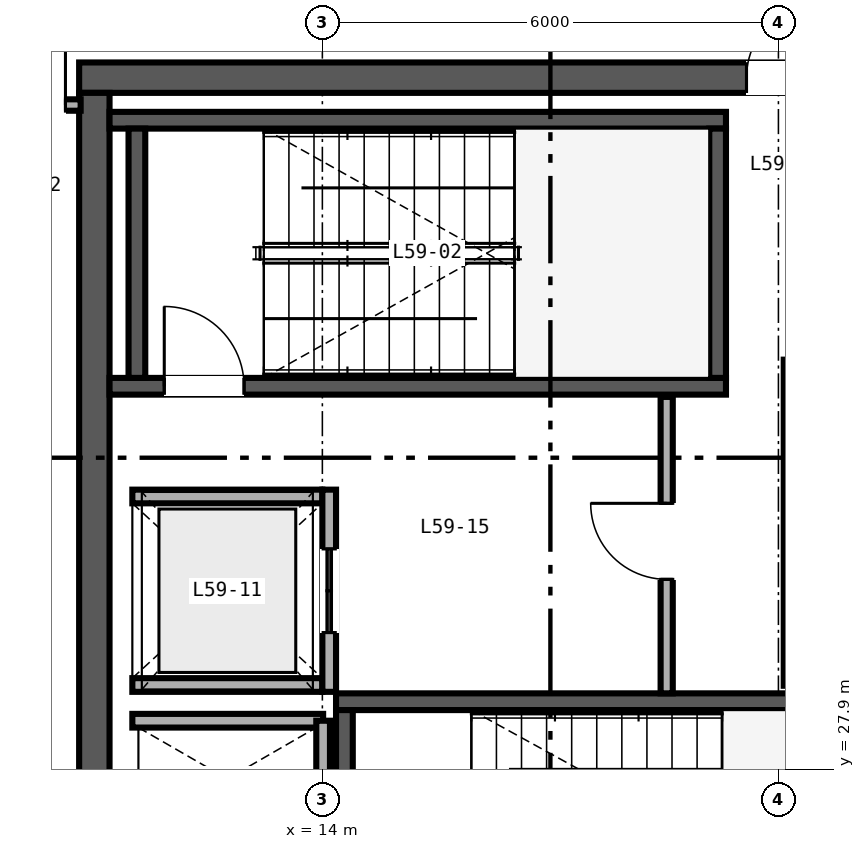
"""IFC4 building model, lengths in metres.
Left out: names, types, materials, properties, quantities, classifications, styles, units other than length and angle.
Written with IfcOpenShell. Run it as: python <this file> out.ifc"""

import sys

from ifc_helpers import new_model, si_unit, direction, frame, frame_2d, origin, place, context, subcontext, project, spatial, rectangle, extrude, source, transform, mapped, element, fill, save


model = new_model("IFC4")
c1 = context("Model", 3, precision=1e-05, world=origin(), true_north=direction((0.0, 1.0)))
c2 = subcontext(c1, "Body", "Model", "MODEL_VIEW")
j1 = project(units=[si_unit("LENGTHUNIT", "METRE"), si_unit("PLANEANGLEUNIT", "RADIAN")], contexts=[c1])
p1 = place(None, origin())
s1 = spatial("IfcSite", under=j1, at=p1, CompositionType="ELEMENT")
p2 = place(p1, origin())
s2 = spatial("IfcBuilding", under=s1, at=p2, CompositionType="ELEMENT")
p3 = place(p2, frame((0.0, 0.0, 236.4)))
s3 = spatial("IfcBuildingStorey", under=s2, at=p3, CompositionType="ELEMENT", Elevation=236.4)
p4 = place(p3, frame((10.8, 37.0, 0.0), z_axis=(0.0, 0.0, 1.0), x_axis=(1.0, 0.0, 0.0)))
e1 = element("IfcWall", 1, at=p4, inside=s3, PredefinedType="SHEAR", context=c2, shape_type="SweptSolid", body=[
    extrude(rectangle(XDim=12.4, YDim=0.4, at=frame_2d((6.2, 0.0))), origin(), (0.0, 0.0, 1.0), 3.38),
])
p5 = place(p4, frame((8.78, 0.0, 0.0)))
e2 = element("IfcOpeningElement", 2, at=p5, cuts=e1, PredefinedType="OPENING", context=c2, shape_type="SweptSolid", body=[
    extrude(rectangle(XDim=1.0, YDim=2.15, at=frame_2d((0.5, 1.075))), frame((0.0, 0.21, 0.0), z_axis=(0.0, -1.0, 0.0), x_axis=(1.0, 0.0, 0.0)), (0.0, 0.0, 1.0), 0.42),
])
p6 = place(p3, frame((11.0, 15.2, 0.0), z_axis=(0.0, 0.0, 1.0), x_axis=(0.0, 1.0, 0.0)))
e3 = element("IfcWall", 3, at=p6, inside=s3, PredefinedType="SHEAR", context=c2, shape_type="SweptSolid", body=[
    extrude(rectangle(XDim=21.6, YDim=0.4, at=frame_2d((10.8, 0.0))), origin(), (0.0, 0.0, 1.0), 3.38),
])
p7 = place(p3, frame((11.2, 32.94, 0.0), z_axis=(0.0, 0.0, 1.0), x_axis=(1.0, 0.0, 0.0)))
e4 = element("IfcWall", 4, at=p7, inside=s3, PredefinedType="SHEAR", context=c2, shape_type="SweptSolid", body=[
    extrude(rectangle(XDim=8.11, YDim=0.22, at=frame_2d((4.055, 0.0))), origin(), (0.0, 0.0, 1.0), 3.4),
])
p8 = place(p7, frame((0.72, 0.0, 0.0)))
e5 = element("IfcOpeningElement", 5, at=p8, cuts=e4, PredefinedType="OPENING", context=c2, shape_type="SweptSolid", body=[
    extrude(rectangle(XDim=1.05, YDim=2.15, at=frame_2d((0.525, 1.075))), frame((0.0, 0.12, 0.0), z_axis=(0.0, -1.0, 0.0), x_axis=(1.0, 0.0, 0.0)), (0.0, 0.0, 1.0), 0.24),
])
p9 = place(p3, frame((11.2, 36.44, 0.0), z_axis=(0.0, 0.0, 1.0), x_axis=(1.0, 0.0, 0.0)))
e6 = element("IfcWall", 6, at=p9, inside=s3, PredefinedType="SHEAR", context=c2, shape_type="SweptSolid", body=[
    extrude(rectangle(XDim=8.11, YDim=0.22, at=frame_2d((4.055, 0.0))), origin(), (0.0, 0.0, 1.0), 3.4),
])
for number, where, z_axis, x_axis in (
    (7, (11.56, 33.05, 0.0), (0.0, 0.0, 1.0), (0.0, 1.0, 0.0)),
    (8, (19.2, 33.05, 0.0), (0.0, 0.0, 1.0), (0.0, 1.0, 0.0)),
):
    element("IfcWall", number, at=place(p3, frame(where, z_axis=z_axis, x_axis=x_axis)), inside=s3, PredefinedType="SHEAR", context=c2, shape_type="SweptSolid", body=[
        extrude(rectangle(XDim=3.28, YDim=0.22, at=frame_2d((1.64, 0.0))), origin(), (0.0, 0.0, 1.0), 3.4),
    ])
p10 = place(p3, frame((14.18, 28.79, 0.0), z_axis=(0.0, 0.0, 1.0), x_axis=(1.0, 0.0, 0.0)))
e9 = element("IfcWall", 9, at=p10, inside=s3, PredefinedType="SHEAR", context=c2, shape_type="SweptSolid", body=[
    extrude(rectangle(XDim=8.62, YDim=0.22, at=frame_2d((4.31, 0.0))), origin(), (0.0, 0.0, 1.0), 3.4),
])
p11 = place(p3, frame((14.29, 25.4, 0.0), z_axis=(0.0, 0.0, 1.0), x_axis=(0.0, 1.0, 0.0)))
e10 = element("IfcWall", 10, at=p11, inside=s3, PredefinedType="SHEAR", context=c2, shape_type="SweptSolid", body=[
    extrude(rectangle(XDim=3.28, YDim=0.22, at=frame_2d((1.64, 0.0))), origin(), (0.0, 0.0, 1.0), 3.4),
])
p12 = place(p3, frame((20.16, 29.0, 0.0), z_axis=(0.0, 0.0, 1.0), x_axis=(0.0, 1.0, 0.0)))
e11 = element("IfcWall", 11, at=p12, inside=s3, PredefinedType="SOLIDWALL", context=c2, shape_type="SweptSolid", body=[
    extrude(rectangle(XDim=4.29, YDim=0.18, at=frame_2d((2.145, 0.0))), origin(), (0.0, 0.0, 1.0), 3.38),
])
for number, where, z_axis, x_axis in (
    (12, (11.5, 29.01, 0.0), (0.0, 0.0, 1.0), (1.0, 0.0, 0.0)),
    (13, (11.5, 31.49, 0.0), (0.0, 0.0, 1.0), (1.0, 0.0, 0.0)),
):
    element("IfcWall", number, at=place(p3, frame(where, z_axis=z_axis, x_axis=x_axis)), inside=s3, PredefinedType="SOLIDWALL", context=c2, shape_type="SweptSolid", body=[
        extrude(rectangle(XDim=2.5, YDim=0.18, at=frame_2d((1.25, 0.0))), origin(), (0.0, 0.0, 1.0), 3.38),
    ])
p13 = place(p3, frame((14.09, 28.92, 0.0), z_axis=(0.0, 0.0, 1.0), x_axis=(0.0, 1.0, 0.0)))
e14 = element("IfcWall", 14, at=p13, inside=s3, PredefinedType="SOLIDWALL", context=c2, shape_type="SweptSolid", body=[
    extrude(rectangle(XDim=2.66, YDim=0.18, at=frame_2d((1.33, 0.0))), origin(), (0.0, 0.0, 1.0), 3.38),
])
p14 = place(p13, frame((0.78, 0.0, 0.0)))
e15 = element("IfcOpeningElement", 15, at=p14, cuts=e14, PredefinedType="OPENING", context=c2, shape_type="SweptSolid", body=[
    extrude(rectangle(XDim=1.1, YDim=2.2, at=frame_2d((0.55, 1.1))), frame((0.0, 0.1, 0.0), z_axis=(0.0, -1.0, 0.0), x_axis=(1.0, 0.0, 0.0)), (0.0, 0.0, 1.0), 0.2),
])
p15 = place(p3, frame((11.5, 28.54, 0.0), z_axis=(0.0, 0.0, 1.0), x_axis=(1.0, 0.0, 0.0)))
e16 = element("IfcWall", 16, at=p15, inside=s3, PredefinedType="SOLIDWALL", context=c2, shape_type="SweptSolid", body=[
    extrude(rectangle(XDim=2.51, YDim=0.18, at=frame_2d((1.255, 0.0))), origin(), (0.0, 0.0, 1.0), 3.38),
])
p16 = place(p3, frame((14.01, 25.46, 0.0), z_axis=(0.0, 0.0, 1.0), x_axis=(0.0, 1.0, 0.0)))
e17 = element("IfcWall", 17, at=p16, inside=s3, PredefinedType="SOLIDWALL", context=c2, shape_type="SweptSolid", body=[
    extrude(rectangle(XDim=3.08, YDim=0.18, at=frame_2d((1.54, 0.0))), origin(), (0.0, 0.0, 1.0), 3.38),
])
p17 = place(p3, frame((18.53, 28.9, 0.0), z_axis=(0.0, 0.0, 1.0), x_axis=(0.0, 1.0, 0.0)))
e18 = element("IfcWall", 18, at=p17, inside=s3, PredefinedType="PARTITIONING", context=c2, shape_type="SweptSolid", body=[
    extrude(rectangle(XDim=3.9, YDim=0.16, at=frame_2d((1.95, 0.0))), origin(), (0.0, 0.0, 1.0), 3.38),
])
p18 = place(p17, frame((1.5, 0.0, 0.0)))
e19 = element("IfcOpeningElement", 19, at=p18, cuts=e18, PredefinedType="OPENING", context=c2, shape_type="SweptSolid", body=[
    extrude(rectangle(XDim=1.0, YDim=2.15, at=frame_2d((0.5, 1.075))), frame((0.0, 0.09, 0.0), z_axis=(0.0, -1.0, 0.0), x_axis=(1.0, 0.0, 0.0)), (0.0, 0.0, 1.0), 0.18),
])
p19 = place(p3, frame((8.16, 36.64, 0.0), z_axis=(0.0, 0.0, 1.0), x_axis=(1.0, 0.0, 0.0)))
e20 = element("IfcWall", 20, at=p19, inside=s3, PredefinedType="PARTITIONING", context=c2, shape_type="SweptSolid", body=[
    extrude(rectangle(XDim=2.66, YDim=0.15, at=frame_2d((1.33, 0.0))), origin(), (0.0, 0.0, 1.0), 2.763),
])
p20 = place(p19, frame((1.58, 0.0, 0.0)))
e21 = element("IfcOpeningElement", 21, at=p20, cuts=e20, PredefinedType="OPENING", context=c2, shape_type="SweptSolid", body=[
    extrude(rectangle(XDim=0.88, YDim=2.15, at=frame_2d((0.44, 1.075))), frame((0.0, 0.085, 0.0), z_axis=(0.0, -1.0, 0.0), x_axis=(1.0, 0.0, 0.0)), (0.0, 0.0, 1.0), 0.17),
])
m1 = source(origin(), c2, "Body", "SweptSolid", [
    extrude(rectangle(XDim=1.05, YDim=2.15, at=frame_2d((0.525, 1.075))), frame((0.0, 0.025, 0.0), z_axis=(0.0, -1.0, 0.0), x_axis=(1.0, 0.0, 0.0)), (0.0, 0.0, 1.0), 0.05),
])
p21 = place(p8, origin())
e22 = element("IfcDoor", 22, at=p21, inside=s3, OperationType="SINGLE_SWING_LEFT", PredefinedType="DOOR", context=c2, shape_type="MappedRepresentation", body=[
    mapped(m1, transform((0.0, 0.0, 0.0), scale=1.0)),
])
fill(e5, e22)
m2 = source(origin(), c2, "Body", "SweptSolid", [
    extrude(rectangle(XDim=1.1, YDim=2.2, at=frame_2d((0.55, 1.1))), frame((0.0, 0.025, 0.0), z_axis=(0.0, -1.0, 0.0), x_axis=(1.0, 0.0, 0.0)), (0.0, 0.0, 1.0), 0.05),
])
p22 = place(p14, origin())
e23 = element("IfcDoor", 23, at=p22, inside=s3, OperationType="DOUBLE_DOOR_SLIDING", PredefinedType="DOOR", context=c2, shape_type="MappedRepresentation", body=[
    mapped(m2, transform((0.0, 0.0, 0.0), scale=1.0)),
])
fill(e15, e23)
m3 = source(origin(), c2, "Body", "SweptSolid", [
    extrude(rectangle(XDim=1.0, YDim=2.15, at=frame_2d((0.5, 1.075))), frame((0.0, 0.025, 0.0), z_axis=(0.0, -1.0, 0.0), x_axis=(1.0, 0.0, 0.0)), (0.0, 0.0, 1.0), 0.05),
])
p23 = place(p18, origin())
e24 = element("IfcDoor", 24, at=p23, inside=s3, OperationType="SINGLE_SWING_RIGHT", PredefinedType="DOOR", context=c2, shape_type="MappedRepresentation", body=[
    mapped(m3, transform((0.0, 0.0, 0.0), scale=1.0)),
])
fill(e19, e24)
p24 = place(p5, origin())
e25 = element("IfcDoor", 25, at=p24, inside=s3, OperationType="SINGLE_SWING_RIGHT", PredefinedType="DOOR", context=c2, shape_type="MappedRepresentation", body=[
    mapped(m3, transform((0.0, 0.0, 0.0), scale=1.0)),
])
fill(e2, e25)
m4 = source(origin(), c2, "Body", "SweptSolid", [
    extrude(rectangle(XDim=0.88, YDim=2.15, at=frame_2d((0.44, 1.075))), frame((0.0, 0.025, 0.0), z_axis=(0.0, -1.0, 0.0), x_axis=(1.0, 0.0, 0.0)), (0.0, 0.0, 1.0), 0.05),
])
p25 = place(p20, origin())
e26 = element("IfcDoor", 26, at=p25, inside=s3, OperationType="SINGLE_SWING_RIGHT", PredefinedType="DOOR", context=c2, shape_type="MappedRepresentation", body=[
    mapped(m4, transform((0.0, 0.0, 0.0), scale=1.0)),
])
fill(e21, e26)
save(model, sys.argv[1])
